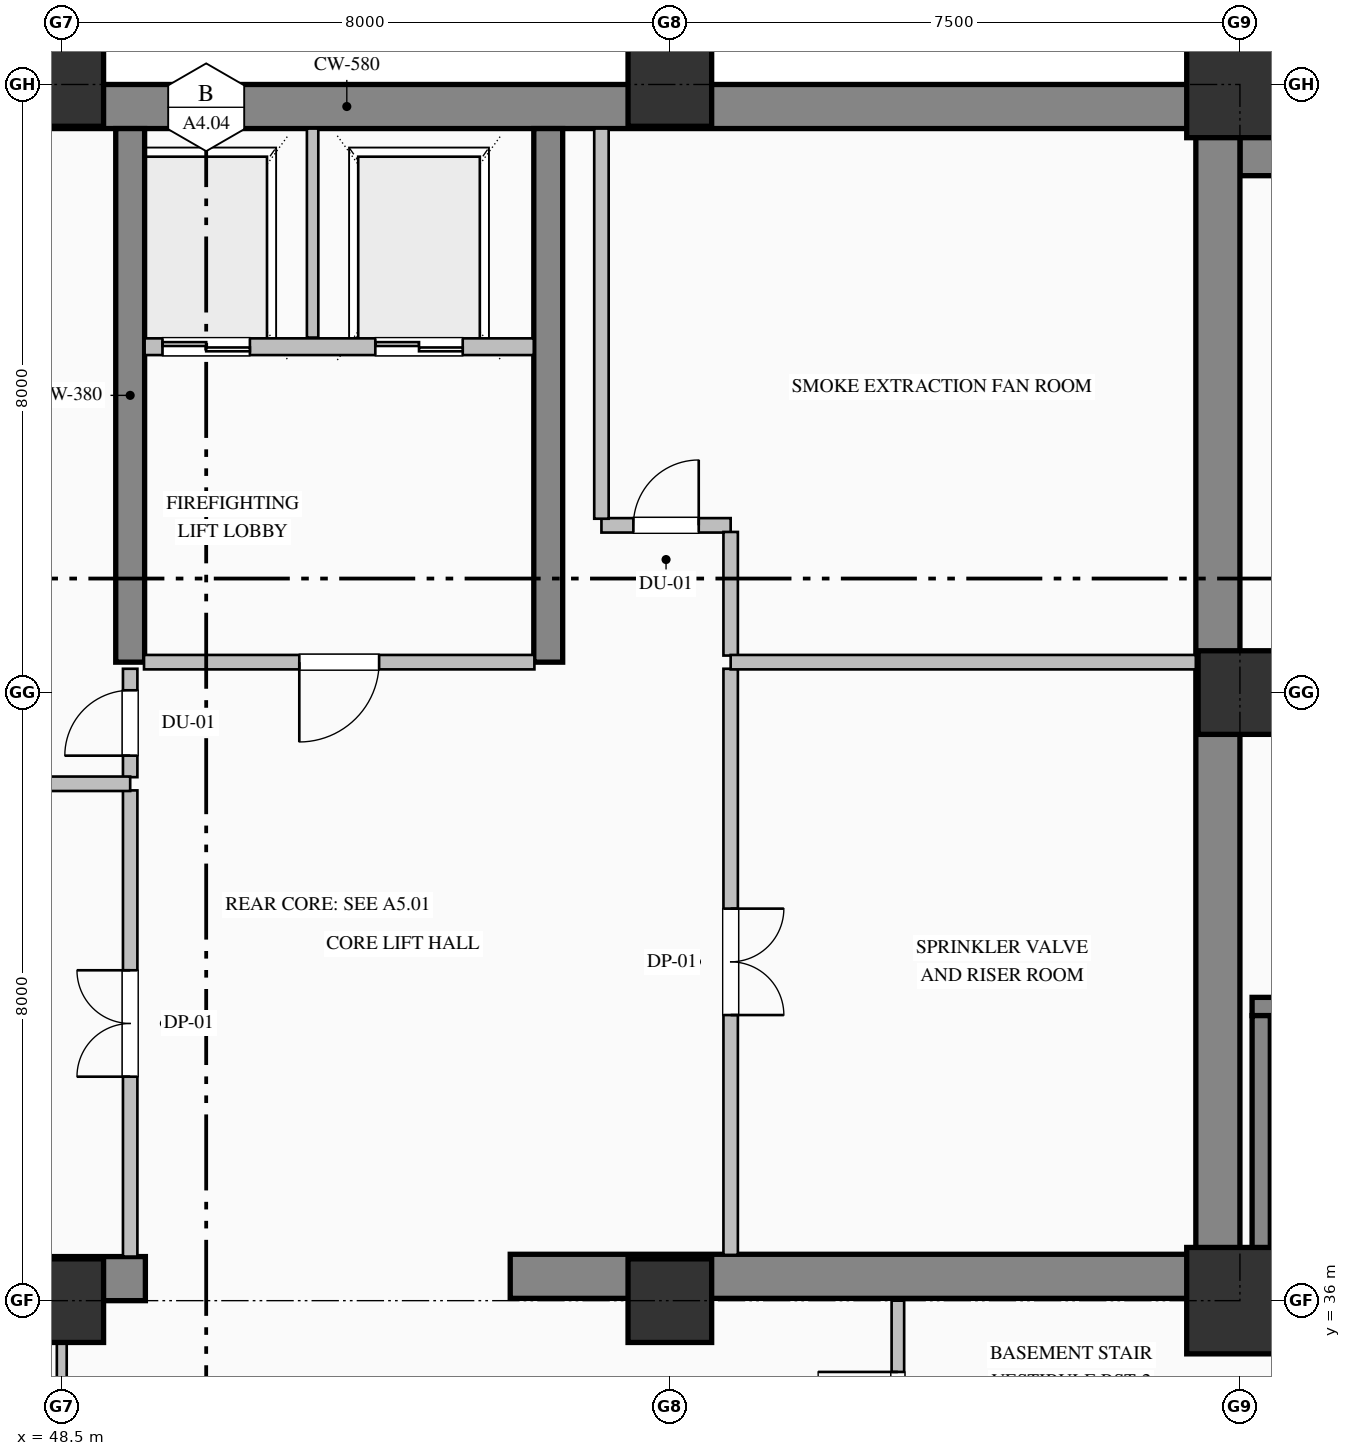
"""IFC4 building model, lengths in metres.
Left out: names, types, materials, properties, quantities, classifications, styles, units other than length and angle.
Written with IfcOpenShell. Run it as: python <this file> out.ifc"""

import sys

from ifc_helpers import new_model, si_unit, direction, frame, frame_2d, origin, origin_2d, place, context, subcontext, project, spatial, rectangle, hollow_rectangle, extrude, element, fill, save


model = new_model("IFC4")
c1 = context("Model", 3, precision=1e-05, world=origin(), true_north=direction((0.0, 1.0)))
c2 = subcontext(c1, "Body", "Model", "MODEL_VIEW")
j1 = project(units=[si_unit("LENGTHUNIT", "METRE"), si_unit("PLANEANGLEUNIT", "RADIAN")], contexts=[c1])
p1 = place(None, origin())
s1 = spatial("IfcSite", under=j1, at=p1, CompositionType="ELEMENT")
p2 = place(p1, origin())
s2 = spatial("IfcBuilding", under=s1, at=p2, CompositionType="ELEMENT")
p3 = place(p2, frame((0.0, 0.0, -9.2)))
s3 = spatial("IfcBuildingStorey", under=s2, at=p3, CompositionType="ELEMENT", Elevation=-9.2)
p4 = place(p3, frame((64.0, 51.4, 0.0), z_axis=(0.0, 0.0, 1.0), x_axis=(1.0, 0.0, 0.0)))
e1 = element("IfcWall", 1, at=p4, inside=s3, PredefinedType="USERDEFINED", context=c2, shape_type="SweptSolid", body=[
    extrude(rectangle(XDim=9.2, YDim=1.2, at=frame_2d((4.6, 0.0))), origin(), (0.0, 0.0, 1.0), 4.6),
])
p5 = place(p3, frame((40.5, 51.71, 0.0), z_axis=(0.0, 0.0, 1.0), x_axis=(1.0, 0.0, 0.0)))
e2 = element("IfcWall", 2, at=p5, inside=s3, PredefinedType="SHEAR", context=c2, shape_type="SweptSolid", body=[
    extrude(rectangle(XDim=23.5, YDim=0.58, at=frame_2d((11.75, 0.0))), origin(), (0.0, 0.0, 1.0), 4.24),
])
p6 = place(p3, frame((63.71, 36.32, 0.0), z_axis=(0.0, 0.0, 1.0), x_axis=(0.0, 1.0, 0.0)))
e3 = element("IfcWall", 3, at=p6, inside=s3, PredefinedType="SHEAR", context=c2, shape_type="SweptSolid", body=[
    extrude(rectangle(XDim=15.1, YDim=0.58, at=frame_2d((7.55, 0.0))), origin(), (0.0, 0.0, 1.0), 4.24),
])
p7 = place(p3, frame((40.5, 36.29, 0.0), z_axis=(0.0, 0.0, 1.0), x_axis=(1.0, 0.0, 0.0)))
e4 = element("IfcWall", 4, at=p7, inside=s3, PredefinedType="SHEAR", context=c2, shape_type="SweptSolid", body=[
    extrude(rectangle(XDim=9.1, YDim=0.58, at=frame_2d((4.55, 0.0))), origin(), (0.0, 0.0, 1.0), 4.24),
])
p8 = place(p3, frame((54.4, 36.32, 0.0), z_axis=(0.0, 0.0, 1.0), x_axis=(1.0, 0.0, 0.0)))
e5 = element("IfcWall", 5, at=p8, inside=s3, PredefinedType="SHEAR", context=c2, shape_type="SweptSolid", body=[
    extrude(rectangle(XDim=9.6, YDim=0.58, at=frame_2d((4.8, 0.0))), origin(), (0.0, 0.0, 1.0), 4.6),
])
for number, where, z_axis, x_axis in (
    (6, (49.4, 44.4, 0.0), (0.0, 0.0, 1.0), (0.0, 1.0, 0.0)),
    (7, (54.9, 44.4, 0.0), (0.0, 0.0, 1.0), (0.0, 1.0, 0.0)),
):
    element("IfcWall", number, at=place(p3, frame(where, z_axis=z_axis, x_axis=x_axis)), inside=s3, PredefinedType="SHEAR", context=c2, shape_type="SweptSolid", body=[
        extrude(rectangle(XDim=7.02, YDim=0.38, at=frame_2d((3.51, 0.0))), origin(), (0.0, 0.0, 1.0), 4.24),
    ])
p9 = place(p3, frame((48.5, 36.0, 0.0), z_axis=(0.0, 0.0, 1.0), x_axis=(1.0, 0.0, 0.0)))
e8 = element("IfcColumn", 8, at=p9, inside=s3, PredefinedType="COLUMN", context=c2, shape_type="SweptSolid", body=[
    extrude(rectangle(XDim=1.1, YDim=1.1, at=origin_2d()), origin(), (0.0, 0.0, 1.0), 4.6),
])
p10 = place(p3, frame((48.5, 52.0, 0.0), z_axis=(0.0, 0.0, 1.0), x_axis=(1.0, 0.0, 0.0)))
e9 = element("IfcColumn", 9, at=p10, inside=s3, PredefinedType="COLUMN", context=c2, shape_type="SweptSolid", body=[
    extrude(hollow_rectangle(XDim=1.1, YDim=1.1, WallThickness=0.04, at=origin_2d()), origin(), (0.0, 0.0, 1.0), 4.6),
])
p11 = place(p3, frame((56.5, 36.0, 0.0), z_axis=(0.0, 0.0, 1.0), x_axis=(1.0, 0.0, 0.0)))
e10 = element("IfcColumn", 10, at=p11, inside=s3, PredefinedType="COLUMN", context=c2, shape_type="SweptSolid", body=[
    extrude(rectangle(XDim=1.1, YDim=1.1, at=origin_2d()), origin(), (0.0, 0.0, 1.0), 4.6),
])
p12 = place(p3, frame((56.5, 52.0, 0.0), z_axis=(0.0, 0.0, 1.0), x_axis=(1.0, 0.0, 0.0)))
e11 = element("IfcColumn", 11, at=p12, inside=s3, PredefinedType="COLUMN", context=c2, shape_type="SweptSolid", body=[
    extrude(hollow_rectangle(XDim=1.1, YDim=1.1, WallThickness=0.04, at=origin_2d()), origin(), (0.0, 0.0, 1.0), 4.6),
])
p13 = place(p3, frame((64.0, 36.0, 0.0), z_axis=(0.0, 0.0, 1.0), x_axis=(1.0, 0.0, 0.0)))
e12 = element("IfcColumn", 12, at=p13, inside=s3, PredefinedType="COLUMN", context=c2, shape_type="SweptSolid", body=[
    extrude(hollow_rectangle(XDim=1.4, YDim=1.4, WallThickness=0.05, at=origin_2d()), origin(), (0.0, 0.0, 1.0), 4.6),
])
p14 = place(p3, frame((64.0, 44.0, 0.0), z_axis=(0.0, 0.0, 1.0), x_axis=(1.0, 0.0, 0.0)))
e13 = element("IfcColumn", 13, at=p14, inside=s3, PredefinedType="COLUMN", context=c2, shape_type="SweptSolid", body=[
    extrude(rectangle(XDim=1.1, YDim=1.1, at=origin_2d()), origin(), (0.0, 0.0, 1.0), 4.6),
])
p15 = place(p3, frame((64.0, 52.0, 0.0), z_axis=(0.0, 0.0, 1.0), x_axis=(1.0, 0.0, 0.0)))
e14 = element("IfcColumn", 14, at=p15, inside=s3, PredefinedType="COLUMN", context=c2, shape_type="SweptSolid", body=[
    extrude(hollow_rectangle(XDim=1.4, YDim=1.4, WallThickness=0.05, at=origin_2d()), origin(), (0.0, 0.0, 1.0), 4.6),
])
p16 = place(p3, frame((64.16, 39.87, 0.0), z_axis=(0.0, 0.0, 1.0), x_axis=(1.0, 0.0, 0.0)))
e15 = element("IfcWall", 15, at=p16, inside=s3, PredefinedType="SOLIDWALL", context=c2, shape_type="SweptSolid", body=[
    extrude(rectangle(XDim=7.82, YDim=0.24, at=frame_2d((3.91, 0.0))), origin(), (0.0, 0.0, 1.0), 4.6),
])
p17 = place(p3, frame((71.98, 36.48, 0.0), z_axis=(0.0, 0.0, 1.0), x_axis=(-1.0, 0.0, 0.0)))
e16 = element("IfcWall", 16, at=p17, inside=s3, PredefinedType="SOLIDWALL", context=c2, shape_type="SweptSolid", body=[
    extrude(rectangle(XDim=7.82, YDim=0.24, at=frame_2d((3.91, 0.0))), origin(), (0.0, 0.0, 1.0), 4.6),
])
p18 = place(p17, frame((6.08, 0.0, 0.0)))
e17 = element("IfcOpeningElement", 17, at=p18, cuts=e16, PredefinedType="OPENING", context=c2, shape_type="SweptSolid", body=[
    extrude(rectangle(XDim=1.15, YDim=2.2, at=frame_2d((0.575, 1.1))), frame((0.0, 0.13, 0.0), z_axis=(0.0, -1.0, 0.0), x_axis=(1.0, 0.0, 0.0)), (0.0, 0.0, 1.0), 0.26),
])
p19 = place(p3, frame((64.28, 39.75, 0.0), z_axis=(0.0, 0.0, 1.0), x_axis=(0.0, -1.0, 0.0)))
e18 = element("IfcWall", 18, at=p19, inside=s3, PredefinedType="SOLIDWALL", context=c2, shape_type="SweptSolid", body=[
    extrude(rectangle(XDim=3.15, YDim=0.24, at=frame_2d((1.575, 0.0))), origin(), (0.0, 0.0, 1.0), 4.6),
])
p20 = place(p3, frame((54.71, 48.55, 0.0), z_axis=(0.0, 0.0, 1.0), x_axis=(-1.0, 0.0, 0.0)))
e19 = element("IfcWall", 19, at=p20, inside=s3, PredefinedType="PARTITIONING", context=c2, shape_type="SweptSolid", body=[
    extrude(rectangle(XDim=5.12, YDim=0.22, at=frame_2d((2.56, 0.0))), origin(), (0.0, 0.0, 1.0), 4.24),
])
p21 = place(p20, frame((3.735, 0.0, 0.0)))
e20 = element("IfcOpeningElement", 20, at=p21, cuts=e19, PredefinedType="OPENING", context=c2, shape_type="SweptSolid", body=[
    extrude(rectangle(XDim=1.15, YDim=2.2, at=frame_2d((0.575, 1.1))), frame((0.0, 0.12, 0.0), z_axis=(0.0, -1.0, 0.0), x_axis=(1.0, 0.0, 0.0)), (0.0, 0.0, 1.0), 0.24),
])
p22 = place(p20, frame((0.935, 0.0, 0.0)))
e21 = element("IfcOpeningElement", 21, at=p22, cuts=e19, PredefinedType="OPENING", context=c2, shape_type="SweptSolid", body=[
    extrude(rectangle(XDim=1.15, YDim=2.2, at=frame_2d((0.575, 1.1))), frame((0.0, 0.12, 0.0), z_axis=(0.0, -1.0, 0.0), x_axis=(1.0, 0.0, 0.0)), (0.0, 0.0, 1.0), 0.24),
])
p23 = place(p3, frame((51.8, 48.67, 0.0), z_axis=(0.0, 0.0, 1.0), x_axis=(0.0, 1.0, 0.0)))
e22 = element("IfcWall", 22, at=p23, inside=s3, PredefinedType="PARTITIONING", context=c2, shape_type="SweptSolid", body=[
    extrude(rectangle(XDim=2.75, YDim=0.15, at=frame_2d((1.375, 0.0))), origin(), (0.0, 0.0, 1.0), 4.24),
])
p24 = place(p3, frame((54.718, 44.4, 0.0), z_axis=(0.0, 0.0, 1.0), x_axis=(-1.0, 0.0, 0.0)))
e23 = element("IfcWall", 23, at=p24, inside=s3, PredefinedType="PARTITIONING", context=c2, shape_type="SweptSolid", body=[
    extrude(rectangle(XDim=5.136, YDim=0.19, at=frame_2d((2.568, 0.0))), origin(), (0.0, 0.0, 1.0), 4.24),
])
p25 = place(p24, frame((2.043, 0.0, 0.0)))
e24 = element("IfcOpeningElement", 24, at=p25, cuts=e23, PredefinedType="OPENING", context=c2, shape_type="SweptSolid", body=[
    extrude(rectangle(XDim=1.05, YDim=2.15, at=frame_2d((0.525, 1.075))), frame((0.0, 0.105, 0.0), z_axis=(0.0, -1.0, 0.0), x_axis=(1.0, 0.0, 0.0)), (0.0, 0.0, 1.0), 0.21),
])
p26 = place(p3, frame((49.4, 36.58, 0.0), z_axis=(0.0, 0.0, 1.0), x_axis=(0.0, 1.0, 0.0)))
e25 = element("IfcWall", 25, at=p26, inside=s3, PredefinedType="PARTITIONING", context=c2, shape_type="SweptSolid", body=[
    extrude(rectangle(XDim=6.133, YDim=0.19, at=frame_2d((3.066, 0.0))), origin(), (0.0, 0.0, 1.0), 3.332),
])
p27 = place(p26, frame((2.366, 0.0, 0.0)))
e26 = element("IfcOpeningElement", 26, at=p27, cuts=e25, PredefinedType="OPENING", context=c2, shape_type="SweptSolid", body=[
    extrude(rectangle(XDim=1.4, YDim=2.25, at=frame_2d((0.7, 1.125))), frame((0.0, 0.105, 0.0), z_axis=(0.0, -1.0, 0.0), x_axis=(1.0, 0.0, 0.0)), (0.0, 0.0, 1.0), 0.21),
])
p28 = place(p3, frame((49.4, 42.887, 0.0), z_axis=(0.0, 0.0, 1.0), x_axis=(0.0, 1.0, 0.0)))
e27 = element("IfcWall", 27, at=p28, inside=s3, PredefinedType="PARTITIONING", context=c2, shape_type="SweptSolid", body=[
    extrude(rectangle(XDim=1.426, YDim=0.19, at=frame_2d((0.713, 0.0))), origin(), (0.0, 0.0, 1.0), 3.332),
])
p29 = place(p28, frame((0.283, 0.0, 0.0)))
e28 = element("IfcOpeningElement", 28, at=p29, cuts=e27, PredefinedType="OPENING", context=c2, shape_type="SweptSolid", body=[
    extrude(rectangle(XDim=0.86, YDim=2.1, at=frame_2d((0.43, 1.05))), frame((0.0, 0.105, 0.0), z_axis=(0.0, -1.0, 0.0), x_axis=(1.0, 0.0, 0.0)), (0.0, 0.0, 1.0), 0.21),
])
p30 = place(p3, frame((57.3, 44.313, 0.0), z_axis=(0.0, 0.0, 1.0), x_axis=(0.0, -1.0, 0.0)))
e29 = element("IfcWall", 29, at=p30, inside=s3, PredefinedType="PARTITIONING", context=c2, shape_type="SweptSolid", body=[
    extrude(rectangle(XDim=7.711, YDim=0.19, at=frame_2d((3.855, 0.0))), origin(), (0.0, 0.0, 1.0), 4.24),
])
p31 = place(p30, frame((3.156, 0.0, 0.0)))
e30 = element("IfcOpeningElement", 30, at=p31, cuts=e29, PredefinedType="OPENING", context=c2, shape_type="SweptSolid", body=[
    extrude(rectangle(XDim=1.4, YDim=2.25, at=frame_2d((0.7, 1.125))), frame((0.0, 0.105, 0.0), z_axis=(0.0, -1.0, 0.0), x_axis=(1.0, 0.0, 0.0)), (0.0, 0.0, 1.0), 0.21),
])
p32 = place(p3, frame((55.6, 46.2, 0.0), z_axis=(0.0, 0.0, 1.0), x_axis=(1.0, 0.0, 0.0)))
e31 = element("IfcWall", 31, at=p32, inside=s3, PredefinedType="PARTITIONING", context=c2, shape_type="SweptSolid", body=[
    extrude(rectangle(XDim=1.7, YDim=0.19, at=frame_2d((0.85, 0.0))), origin(), (0.0, 0.0, 1.0), 4.24),
])
p33 = place(p32, frame((0.42, 0.0, 0.0)))
e32 = element("IfcOpeningElement", 32, at=p33, cuts=e31, PredefinedType="OPENING", context=c2, shape_type="SweptSolid", body=[
    extrude(rectangle(XDim=0.86, YDim=2.1, at=frame_2d((0.43, 1.05))), frame((0.0, 0.105, 0.0), z_axis=(0.0, -1.0, 0.0), x_axis=(1.0, 0.0, 0.0)), (0.0, 0.0, 1.0), 0.21),
])
p34 = place(p3, frame((57.3, 46.113, 0.0), z_axis=(0.0, 0.0, 1.0), x_axis=(0.0, -1.0, 0.0)))
e33 = element("IfcWall", 33, at=p34, inside=s3, PredefinedType="PARTITIONING", context=c2, shape_type="SweptSolid", body=[
    extrude(rectangle(XDim=1.626, YDim=0.19, at=frame_2d((0.813, 0.0))), origin(), (0.0, 0.0, 1.0), 4.24),
])
p35 = place(p3, frame((41.08, 42.8, 0.0), z_axis=(0.0, 0.0, 1.0), x_axis=(1.0, 0.0, 0.0)))
e34 = element("IfcWall", 34, at=p35, inside=s3, PredefinedType="PARTITIONING", context=c2, shape_type="SweptSolid", body=[
    extrude(rectangle(XDim=8.32, YDim=0.19, at=frame_2d((4.16, 0.0))), origin(), (0.0, 0.0, 1.0), 4.24),
])
p36 = place(p3, frame((57.3, 44.4, 0.0), z_axis=(0.0, 0.0, 1.0), x_axis=(1.0, 0.0, 0.0)))
e35 = element("IfcWall", 35, at=p36, inside=s3, PredefinedType="PARTITIONING", context=c2, shape_type="SweptSolid", body=[
    extrude(rectangle(XDim=6.12, YDim=0.19, at=frame_2d((3.06, 0.0))), origin(), (0.0, 0.0, 1.0), 4.24),
])
p37 = place(p3, frame((55.6, 46.287, 0.0), z_axis=(0.0, 0.0, 1.0), x_axis=(0.0, 1.0, 0.0)))
e36 = element("IfcWall", 36, at=p37, inside=s3, PredefinedType="PARTITIONING", context=c2, shape_type="SweptSolid", body=[
    extrude(rectangle(XDim=5.133, YDim=0.19, at=frame_2d((2.566, 0.0))), origin(), (0.0, 0.0, 1.0), 4.24),
])
p38 = place(p3, frame((59.5, 33.074, 0.0), z_axis=(0.0, 0.0, 1.0), x_axis=(0.0, 1.0, 0.0)))
e37 = element("IfcWall", 37, at=p38, inside=s3, PredefinedType="PARTITIONING", context=c2, shape_type="SweptSolid", body=[
    extrude(rectangle(XDim=2.926, YDim=0.165, at=frame_2d((1.463, 0.0))), origin(), (0.0, 0.0, 1.0), 4.24),
])
p39 = place(p38, frame((0.938, 0.0, 0.0)))
e38 = element("IfcOpeningElement", 38, at=p39, cuts=e37, PredefinedType="OPENING", context=c2, shape_type="SweptSolid", body=[
    extrude(rectangle(XDim=1.05, YDim=2.15, at=frame_2d((0.525, 1.075))), frame((0.0, 0.093, 0.0), z_axis=(0.0, -1.0, 0.0), x_axis=(1.0, 0.0, 0.0)), (0.0, 0.0, 1.0), 0.185),
])
p40 = place(p3, frame((48.5, 32.574, 0.0), z_axis=(0.0, 0.0, 1.0), x_axis=(0.0, 1.0, 0.0)))
e39 = element("IfcWall", 39, at=p40, inside=s3, PredefinedType="PARTITIONING", context=c2, shape_type="SweptSolid", body=[
    extrude(rectangle(XDim=3.426, YDim=0.13, at=frame_2d((1.713, 0.0))), origin(), (0.0, 0.0, 1.0), 3.332),
])
p41 = place(p21, origin())
e40 = element("IfcDoor", 40, at=p41, inside=s3, OperationType="DOUBLE_DOOR_SLIDING", PredefinedType="DOOR", context=c2, shape_type="SweptSolid", body=[
    extrude(rectangle(XDim=1.15, YDim=2.2, at=frame_2d((0.575, 1.1))), frame((0.0, 0.025, 0.0), z_axis=(0.0, -1.0, 0.0), x_axis=(1.0, 0.0, 0.0)), (0.0, 0.0, 1.0), 0.05),
])
fill(e20, e40)
p42 = place(p22, origin())
e41 = element("IfcDoor", 41, at=p42, inside=s3, OperationType="DOUBLE_DOOR_SLIDING", PredefinedType="DOOR", context=c2, shape_type="SweptSolid", body=[
    extrude(rectangle(XDim=1.15, YDim=2.2, at=frame_2d((0.575, 1.1))), frame((0.0, 0.025, 0.0), z_axis=(0.0, -1.0, 0.0), x_axis=(1.0, 0.0, 0.0)), (0.0, 0.0, 1.0), 0.05),
])
fill(e21, e41)
p43 = place(p25, origin())
e42 = element("IfcDoor", 42, at=p43, inside=s3, OperationType="SINGLE_SWING_RIGHT", PredefinedType="DOOR", context=c2, shape_type="SweptSolid", body=[
    extrude(rectangle(XDim=1.05, YDim=2.15, at=frame_2d((0.525, 1.075))), frame((0.0, 0.025, 0.0), z_axis=(0.0, -1.0, 0.0), x_axis=(1.0, 0.0, 0.0)), (0.0, 0.0, 1.0), 0.05),
])
fill(e24, e42)
p44 = place(p39, origin())
e43 = element("IfcDoor", 43, at=p44, inside=s3, OperationType="SINGLE_SWING_RIGHT", PredefinedType="DOOR", context=c2, shape_type="SweptSolid", body=[
    extrude(rectangle(XDim=1.05, YDim=2.15, at=frame_2d((0.525, 1.075))), frame((0.0, 0.025, 0.0), z_axis=(0.0, -1.0, 0.0), x_axis=(1.0, 0.0, 0.0)), (0.0, 0.0, 1.0), 0.05),
])
fill(e38, e43)
p45 = place(p27, origin())
e44 = element("IfcDoor", 44, at=p45, inside=s3, OperationType="DOUBLE_DOOR_SINGLE_SWING", PredefinedType="DOOR", context=c2, shape_type="SweptSolid", body=[
    extrude(rectangle(XDim=1.4, YDim=2.25, at=frame_2d((0.7, 1.125))), frame((0.0, 0.025, 0.0), z_axis=(0.0, -1.0, 0.0), x_axis=(1.0, 0.0, 0.0)), (0.0, 0.0, 1.0), 0.05),
])
fill(e26, e44)
p46 = place(p29, origin())
e45 = element("IfcDoor", 45, at=p46, inside=s3, OperationType="SINGLE_SWING_LEFT", PredefinedType="DOOR", context=c2, shape_type="SweptSolid", body=[
    extrude(rectangle(XDim=0.86, YDim=2.1, at=frame_2d((0.43, 1.05))), frame((0.0, 0.025, 0.0), z_axis=(0.0, -1.0, 0.0), x_axis=(1.0, 0.0, 0.0)), (0.0, 0.0, 1.0), 0.05),
])
fill(e28, e45)
p47 = place(p31, origin())
e46 = element("IfcDoor", 46, at=p47, inside=s3, OperationType="DOUBLE_DOOR_SINGLE_SWING", PredefinedType="DOOR", context=c2, shape_type="SweptSolid", body=[
    extrude(rectangle(XDim=1.4, YDim=2.25, at=frame_2d((0.7, 1.125))), frame((0.0, 0.025, 0.0), z_axis=(0.0, -1.0, 0.0), x_axis=(1.0, 0.0, 0.0)), (0.0, 0.0, 1.0), 0.05),
])
fill(e30, e46)
p48 = place(p33, origin())
e47 = element("IfcDoor", 47, at=p48, inside=s3, OperationType="SINGLE_SWING_RIGHT", PredefinedType="DOOR", context=c2, shape_type="SweptSolid", body=[
    extrude(rectangle(XDim=0.86, YDim=2.1, at=frame_2d((0.43, 1.05))), frame((0.0, 0.025, 0.0), z_axis=(0.0, -1.0, 0.0), x_axis=(1.0, 0.0, 0.0)), (0.0, 0.0, 1.0), 0.05),
])
fill(e32, e47)
save(model, sys.argv[1])
